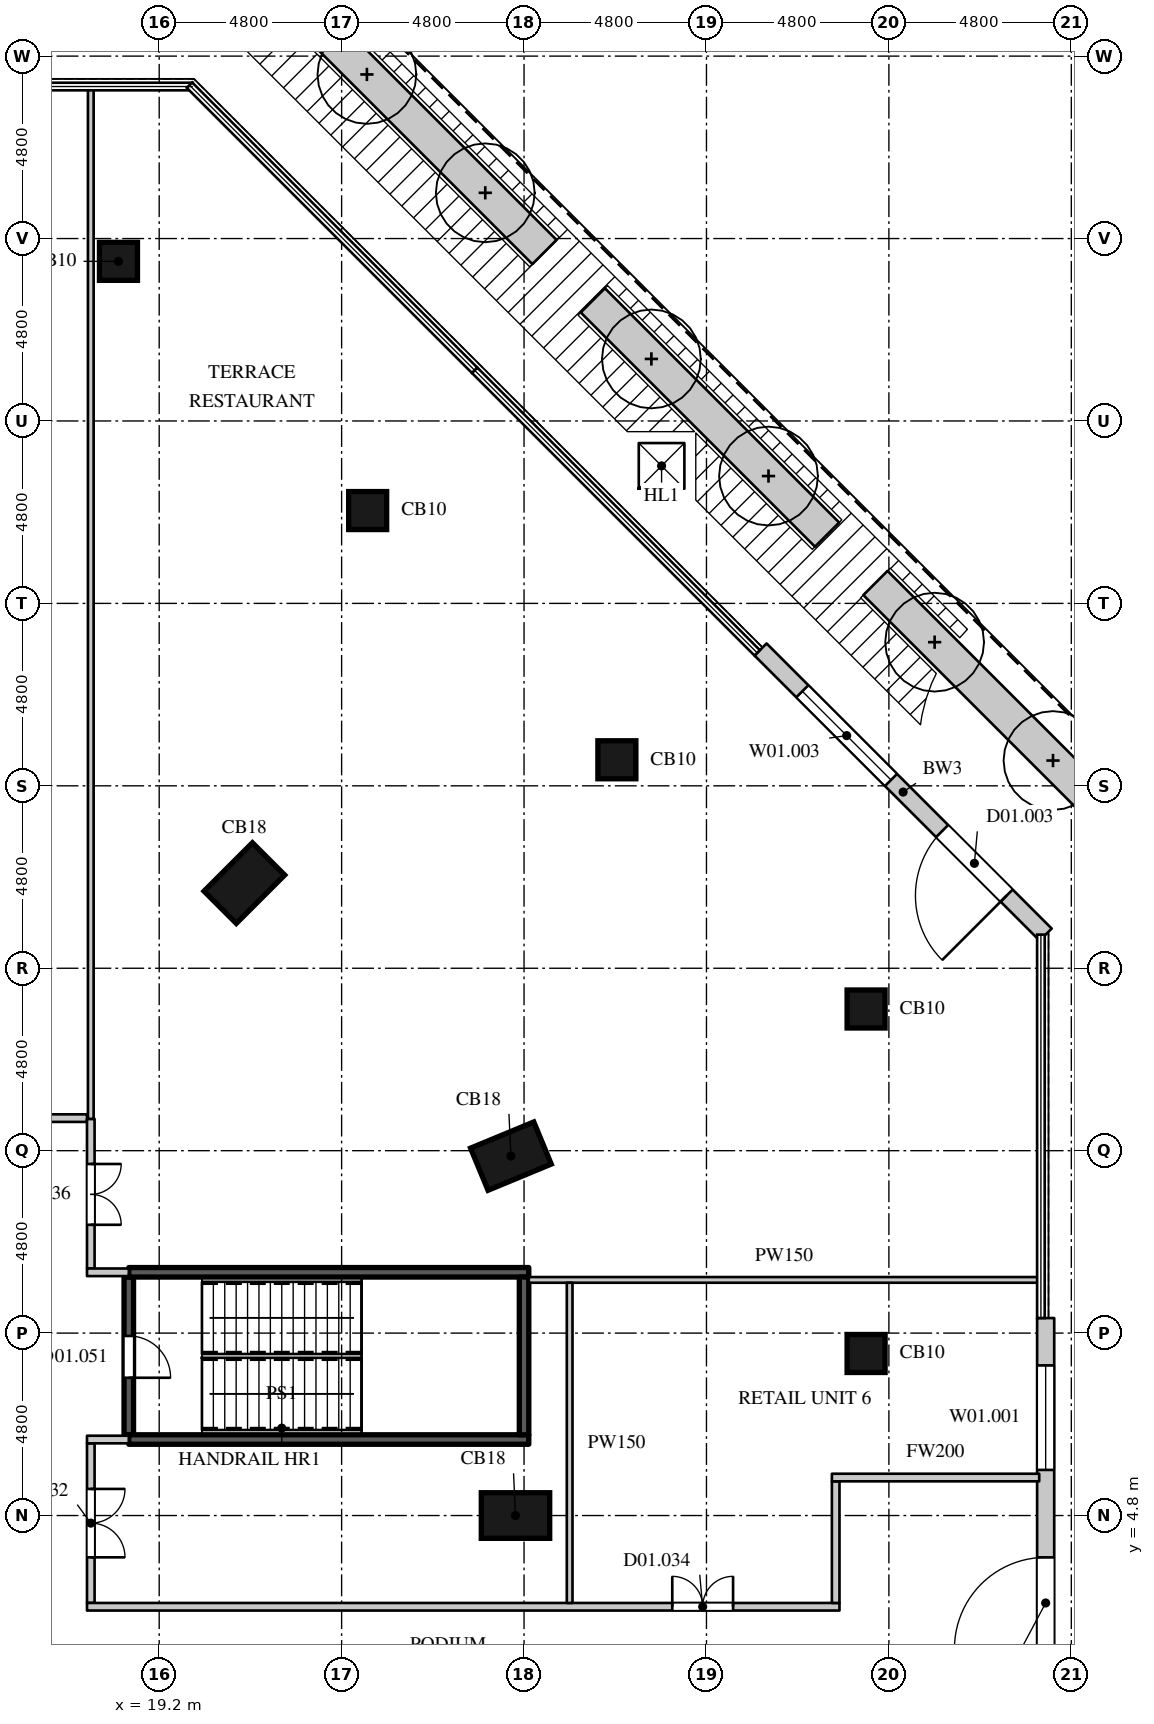
"""IFC4 building model, lengths in metres.
Left out: names, types, materials, properties, quantities, classifications, styles, units other than length and angle.
Written with IfcOpenShell. Run it as: python <this file> out.ifc"""

import sys

from ifc_helpers import new_model, si_unit, direction, frame, frame_2d, origin, origin_2d, place, context, subcontext, project, spatial, rectangle, extrude, element, fill, save


model = new_model("IFC4")
c1 = context("Model", 3, precision=1e-05, world=origin(), true_north=direction((0.0, 1.0)))
c2 = subcontext(c1, "Body", "Model", "MODEL_VIEW")
j1 = project(units=[si_unit("LENGTHUNIT", "METRE"), si_unit("PLANEANGLEUNIT", "RADIAN")], contexts=[c1])
p1 = place(None, origin())
s1 = spatial("IfcSite", under=j1, at=p1, CompositionType="ELEMENT")
p2 = place(p1, origin())
s2 = spatial("IfcBuilding", under=s1, at=p2, CompositionType="ELEMENT")
p3 = place(p2, frame((0.0, 0.0, 6.0)))
s3 = spatial("IfcBuildingStorey", under=s2, at=p3, CompositionType="ELEMENT", Elevation=6.0)
p4 = place(p3, frame((28.575, 4.8, 0.0), z_axis=(0.0, 0.0, 1.0), x_axis=(0.0, 1.0, 0.0)))
e1 = element("IfcColumn", 1, at=p4, inside=s3, PredefinedType="COLUMN", context=c2, shape_type="SweptSolid", body=[
    extrude(rectangle(XDim=1.2, YDim=1.8, at=origin_2d()), origin(), (0.0, 0.0, 1.0), 5.0),
])
p5 = place(p3, frame((37.8, 9.064, 0.0), z_axis=(0.0, 0.0, 1.0), x_axis=(1.0, 0.0, 0.0)))
e2 = element("IfcColumn", 2, at=p5, inside=s3, PredefinedType="COLUMN", context=c2, shape_type="SweptSolid", body=[
    extrude(rectangle(XDim=1.0, YDim=1.0, at=origin_2d()), origin(), (0.0, 0.0, 1.0), 5.0),
])
p6 = place(p3, frame((28.454, 14.257, 0.0), z_axis=(0.0, 0.0, 1.0), x_axis=(-0.382683496864, 0.923879505795, 0.0)))
e3 = element("IfcColumn", 3, at=p6, inside=s3, PredefinedType="COLUMN", context=c2, shape_type="SweptSolid", body=[
    extrude(rectangle(XDim=1.2, YDim=1.8, at=origin_2d()), origin(), (0.0, 0.0, 1.0), 5.0),
])
p7 = place(p3, frame((37.8, 18.128, 0.0), z_axis=(0.0, 0.0, 1.0), x_axis=(1.0, 0.0, 0.0)))
e4 = element("IfcColumn", 4, at=p7, inside=s3, PredefinedType="COLUMN", context=c2, shape_type="SweptSolid", body=[
    extrude(rectangle(XDim=1.0, YDim=1.0, at=origin_2d()), origin(), (0.0, 0.0, 1.0), 5.0),
])
p8 = place(p3, frame((21.441, 21.441, 0.0), z_axis=(0.0, 0.0, 1.0), x_axis=(-0.707106781187, 0.707106781187, 0.0)))
e5 = element("IfcColumn", 5, at=p8, inside=s3, PredefinedType="COLUMN", context=c2, shape_type="SweptSolid", body=[
    extrude(rectangle(XDim=1.2, YDim=1.8, at=origin_2d()), origin(), (0.0, 0.0, 1.0), 5.0),
])
for number, where, z_axis, x_axis in (
    (6, (31.243, 24.685, 0.0), (0.0, 0.0, 1.0), (1.0, 0.0, 0.0)),
    (7, (24.685, 31.243, 0.0), (0.0, 0.0, 1.0), (1.0, 0.0, 0.0)),
    (8, (18.128, 37.8, 0.0), (0.0, 0.0, 1.0), (1.0, 0.0, 0.0)),
):
    element("IfcColumn", number, at=place(p3, frame(where, z_axis=z_axis, x_axis=x_axis)), inside=s3, PredefinedType="COLUMN", context=c2, shape_type="SweptSolid", body=[
        extrude(rectangle(XDim=1.0, YDim=1.0, at=origin_2d()), origin(), (0.0, 0.0, 1.0), 5.0),
    ])
p9 = place(p3, frame((42.525, 0.0, 0.0), z_axis=(0.0, 0.0, 1.0), x_axis=(0.0, 1.0, 0.0)))
e9 = element("IfcWall", 9, at=p9, inside=s3, PredefinedType="ELEMENTEDWALL", context=c2, shape_type="SweptSolid", body=[
    extrude(rectangle(XDim=9.996, YDim=0.45, at=frame_2d((4.998, 0.0))), origin(), (0.0, 0.0, 1.0), 4.7),
])
p10 = place(p9, frame((1.299, 0.0, 0.0)))
e10 = element("IfcOpeningElement", 10, at=p10, cuts=e9, PredefinedType="OPENING", context=c2, shape_type="SweptSolid", body=[
    extrude(rectangle(XDim=2.4, YDim=2.7, at=frame_2d((1.2, 1.35))), frame((0.0, 0.235, 0.0), z_axis=(0.0, -1.0, 0.0), x_axis=(1.0, 0.0, 0.0)), (0.0, 0.0, 1.0), 0.47),
])
p11 = place(p9, frame((6.0, 0.0, 1.05)))
e11 = element("IfcOpeningElement", 11, at=p11, cuts=e9, PredefinedType="OPENING", context=c2, shape_type="SweptSolid", body=[
    extrude(rectangle(XDim=2.75, YDim=2.7, at=frame_2d((1.375, 1.35))), frame((0.0, 0.235, 0.0), z_axis=(0.0, -1.0, 0.0), x_axis=(1.0, 0.0, 0.0)), (0.0, 0.0, 1.0), 0.47),
])
p12 = place(p3, frame((42.525, 20.085, 0.0), z_axis=(0.0, 0.0, 1.0), x_axis=(-0.707106781187, 0.707106781187, 0.0)))
e12 = element("IfcWall", 12, at=p12, inside=s3, PredefinedType="ELEMENTEDWALL", context=c2, shape_type="SweptSolid", body=[
    extrude(rectangle(XDim=10.609, YDim=0.45, at=frame_2d((5.305, 0.0))), origin(), (0.0, 0.0, 1.0), 4.7),
])
p13 = place(p12, frame((1.452, 0.0, 0.0)))
e13 = element("IfcOpeningElement", 13, at=p13, cuts=e12, PredefinedType="OPENING", context=c2, shape_type="SweptSolid", body=[
    extrude(rectangle(XDim=2.4, YDim=2.7, at=frame_2d((1.2, 1.35))), frame((0.0, 0.235, 0.0), z_axis=(0.0, -1.0, 0.0), x_axis=(1.0, 0.0, 0.0)), (0.0, 0.0, 1.0), 0.47),
])
p14 = place(p12, frame((5.755, 0.0, 1.05)))
e14 = element("IfcOpeningElement", 14, at=p14, cuts=e12, PredefinedType="OPENING", context=c2, shape_type="SweptSolid", body=[
    extrude(rectangle(XDim=3.3, YDim=2.7, at=frame_2d((1.65, 1.35))), frame((0.0, 0.235, 0.0), z_axis=(0.0, -1.0, 0.0), x_axis=(1.0, 0.0, 0.0)), (0.0, 0.0, 1.0), 0.47),
])
p15 = place(p3, frame((44.275, 23.108, 0.0), z_axis=(0.0, 0.0, 1.0), x_axis=(-0.707106781187, 0.707106781187, 0.0)))
e15 = element("IfcWall", 15, at=p15, inside=s3, PredefinedType="USERDEFINED", context=c2, shape_type="SweptSolid", body=[
    extrude(rectangle(XDim=8.81, YDim=0.9, at=frame_2d((4.405, 0.0))), origin(), (0.0, 0.0, 1.0), 0.9),
])
p16 = place(p3, frame((36.773, 30.61, 0.0), z_axis=(0.0, 0.0, 1.0), x_axis=(-0.707106781187, 0.707106781187, 0.0)))
e16 = element("IfcWall", 16, at=p16, inside=s3, PredefinedType="USERDEFINED", context=c2, shape_type="SweptSolid", body=[
    extrude(rectangle(XDim=8.716, YDim=0.9, at=frame_2d((4.358, 0.0))), origin(), (0.0, 0.0, 1.0), 0.9),
])
p17 = place(p3, frame((29.337, 38.046, 0.0), z_axis=(0.0, 0.0, 1.0), x_axis=(-0.707106781187, 0.707106781187, 0.0)))
e17 = element("IfcWall", 17, at=p17, inside=s3, PredefinedType="USERDEFINED", context=c2, shape_type="SweptSolid", body=[
    extrude(rectangle(XDim=8.81, YDim=0.9, at=frame_2d((4.405, 0.0))), origin(), (0.0, 0.0, 1.0), 0.9),
])
p18 = place(p3, frame((11.1, 15.257, 0.0), z_axis=(0.0, 0.0, 1.0), x_axis=(1.0, 0.0, 0.0)))
e18 = element("IfcWall", 18, at=p18, inside=s3, PredefinedType="PARTITIONING", context=c2, shape_type="SweptSolid", body=[
    extrude(rectangle(XDim=6.2, YDim=0.2, at=frame_2d((3.1, 0.0))), origin(), (0.0, 0.0, 1.0), 4.4),
])
p19 = place(p3, frame((17.4, 2.5, 0.0), z_axis=(0.0, 0.0, 1.0), x_axis=(0.0, 1.0, 0.0)))
e19 = element("IfcWall", 19, at=p19, inside=s3, PredefinedType="PARTITIONING", context=c2, shape_type="SweptSolid", body=[
    extrude(rectangle(XDim=4.2, YDim=0.2, at=frame_2d((2.1, 0.0))), origin(), (0.0, 0.0, 1.0), 4.4),
])
p20 = place(p19, frame((1.2, 0.0, 0.0)))
e20 = element("IfcOpeningElement", 20, at=p20, cuts=e19, PredefinedType="OPENING", context=c2, shape_type="SweptSolid", body=[
    extrude(rectangle(XDim=1.8, YDim=2.4, at=frame_2d((0.9, 1.2))), frame((0.0, 0.11, 0.0), z_axis=(0.0, -1.0, 0.0), x_axis=(1.0, 0.0, 0.0)), (0.0, 0.0, 1.0), 0.22),
])
p21 = place(p3, frame((17.3, 2.4, 0.0), z_axis=(0.0, 0.0, 1.0), x_axis=(1.0, 0.0, 0.0)))
e21 = element("IfcWall", 21, at=p21, inside=s3, PredefinedType="PARTITIONING", context=c2, shape_type="SweptSolid", body=[
    extrude(rectangle(XDim=19.8, YDim=0.2, at=frame_2d((9.9, 0.0))), origin(), (0.0, 0.0, 1.0), 4.4),
])
p22 = place(p21, frame((15.4, 0.0, 0.0)))
e22 = element("IfcOpeningElement", 22, at=p22, cuts=e21, PredefinedType="OPENING", context=c2, shape_type="SweptSolid", body=[
    extrude(rectangle(XDim=1.6, YDim=2.4, at=frame_2d((0.8, 1.2))), frame((0.0, 0.11, 0.0), z_axis=(0.0, -1.0, 0.0), x_axis=(1.0, 0.0, 0.0)), (0.0, 0.0, 1.0), 0.22),
])
p23 = place(p3, frame((17.3, 6.8, 0.0), z_axis=(0.0, 0.0, 1.0), x_axis=(1.0, 0.0, 0.0)))
e23 = element("IfcWall", 23, at=p23, inside=s3, PredefinedType="PARTITIONING", context=c2, shape_type="SweptSolid", body=[
    extrude(rectangle(XDim=1.1, YDim=0.2, at=frame_2d((0.55, 0.0))), origin(), (0.0, 0.0, 1.0), 4.4),
])
p24 = place(p3, frame((17.4, 11.3, 0.0), z_axis=(0.0, 0.0, 1.0), x_axis=(0.0, 1.0, 0.0)))
e24 = element("IfcWall", 24, at=p24, inside=s3, PredefinedType="PARTITIONING", context=c2, shape_type="SweptSolid", body=[
    extrude(rectangle(XDim=3.937, YDim=0.2, at=frame_2d((1.968, 0.0))), origin(), (0.0, 0.0, 1.0), 4.4),
])
p25 = place(p24, frame((1.15, 0.0, 0.0)))
e25 = element("IfcOpeningElement", 25, at=p25, cuts=e24, PredefinedType="OPENING", context=c2, shape_type="SweptSolid", body=[
    extrude(rectangle(XDim=1.6, YDim=2.4, at=frame_2d((0.8, 1.2))), frame((0.0, 0.11, 0.0), z_axis=(0.0, -1.0, 0.0), x_axis=(1.0, 0.0, 0.0)), (0.0, 0.0, 1.0), 0.22),
])
p26 = place(p3, frame((17.3, 11.2, 0.0), z_axis=(0.0, 0.0, 1.0), x_axis=(1.0, 0.0, 0.0)))
e26 = element("IfcWall", 26, at=p26, inside=s3, PredefinedType="PARTITIONING", context=c2, shape_type="SweptSolid", body=[
    extrude(rectangle(XDim=1.1, YDim=0.2, at=frame_2d((0.55, 0.0))), origin(), (0.0, 0.0, 1.0), 4.4),
])
p27 = place(p3, frame((37.0, 2.5, 0.0), z_axis=(0.0, 0.0, 1.0), x_axis=(0.0, 1.0, 0.0)))
e27 = element("IfcWall", 27, at=p27, inside=s3, PredefinedType="PARTITIONING", context=c2, shape_type="SweptSolid", body=[
    extrude(rectangle(XDim=3.2, YDim=0.2, at=frame_2d((1.6, 0.0))), origin(), (0.0, 0.0, 1.0), 4.4),
])
p28 = place(p3, frame((36.9, 5.8, 0.0), z_axis=(0.0, 0.0, 1.0), x_axis=(1.0, 0.0, 0.0)))
e28 = element("IfcWall", 28, at=p28, inside=s3, PredefinedType="PARTITIONING", context=c2, shape_type="SweptSolid", body=[
    extrude(rectangle(XDim=5.455, YDim=0.2, at=frame_2d((2.728, 0.0))), origin(), (0.0, 0.0, 1.0), 4.4),
])
p29 = place(p3, frame((17.4, 15.237, 0.0), z_axis=(0.0, 0.0, 1.0), x_axis=(0.0, 1.0, 0.0)))
e29 = element("IfcWall", 29, at=p29, inside=s3, PredefinedType="PARTITIONING", context=c2, shape_type="SweptSolid", body=[
    extrude(rectangle(XDim=27.118, YDim=0.15, at=frame_2d((13.559, 0.0))), origin(), (0.0, 0.0, 1.0), 4.4),
])
p30 = place(p3, frame((28.925, 11.0, 0.0), z_axis=(0.0, 0.0, 1.0), x_axis=(1.0, 0.0, 0.0)))
e30 = element("IfcWall", 30, at=p30, inside=s3, PredefinedType="PARTITIONING", context=c2, shape_type="SweptSolid", body=[
    extrude(rectangle(XDim=13.43, YDim=0.15, at=frame_2d((6.715, 0.0))), origin(), (0.0, 0.0, 1.0), 4.4),
])
p31 = place(p3, frame((30.0, 2.5, 0.0), z_axis=(0.0, 0.0, 1.0), x_axis=(0.0, 1.0, 0.0)))
e31 = element("IfcWall", 31, at=p31, inside=s3, PredefinedType="PARTITIONING", context=c2, shape_type="SweptSolid", body=[
    extrude(rectangle(XDim=8.425, YDim=0.15, at=frame_2d((4.212, 0.0))), origin(), (0.0, 0.0, 1.0), 4.4),
])
p32 = place(p3, frame((18.4, 6.925, 0.0), z_axis=(0.0, 0.0, 1.0), x_axis=(0.0, 1.0, 0.0)))
e32 = element("IfcWall", 32, at=p32, inside=s3, PredefinedType="SHEAR", context=c2, shape_type="SweptSolid", body=[
    extrude(rectangle(XDim=4.15, YDim=0.25, at=frame_2d((2.075, 0.0))), origin(), (0.0, 0.0, 1.0), 4.65),
])
p33 = place(p32, frame((1.5, 0.0, 0.0)))
e33 = element("IfcOpeningElement", 33, at=p33, cuts=e32, PredefinedType="OPENING", context=c2, shape_type="SweptSolid", body=[
    extrude(rectangle(XDim=1.1, YDim=2.2, at=frame_2d((0.55, 1.1))), frame((0.0, 0.135, 0.0), z_axis=(0.0, -1.0, 0.0), x_axis=(1.0, 0.0, 0.0)), (0.0, 0.0, 1.0), 0.27),
])
for number, where, z_axis, x_axis in (
    (34, (18.4, 6.8, 0.0), (0.0, 0.0, 1.0), (1.0, 0.0, 0.0)),
    (35, (18.4, 11.2, 0.0), (0.0, 0.0, 1.0), (1.0, 0.0, 0.0)),
):
    element("IfcWall", number, at=place(p3, frame(where, z_axis=z_axis, x_axis=x_axis)), inside=s3, PredefinedType="SHEAR", context=c2, shape_type="SweptSolid", body=[
        extrude(rectangle(XDim=10.525, YDim=0.25, at=frame_2d((5.263, 0.0))), origin(), (0.0, 0.0, 1.0), 4.65),
    ])
p34 = place(p3, frame((28.8, 6.925, 0.0), z_axis=(0.0, 0.0, 1.0), x_axis=(0.0, 1.0, 0.0)))
e36 = element("IfcWall", 36, at=p34, inside=s3, PredefinedType="SHEAR", context=c2, shape_type="SweptSolid", body=[
    extrude(rectangle(XDim=4.15, YDim=0.25, at=frame_2d((2.075, 0.0))), origin(), (0.0, 0.0, 1.0), 4.65),
])
p35 = place(p10, origin())
e37 = element("IfcDoor", 37, at=p35, inside=s3, OperationType="SINGLE_SWING_LEFT", PredefinedType="DOOR", context=c2, shape_type="SweptSolid", body=[
    extrude(rectangle(XDim=2.4, YDim=2.7, at=frame_2d((1.2, 1.35))), frame((0.0, 0.13, 0.0), z_axis=(0.0, -1.0, 0.0), x_axis=(1.0, 0.0, 0.0)), (0.0, 0.0, 1.0), 0.05),
])
fill(e10, e37)
p36 = place(p11, origin())
e38 = element("IfcWindow", 38, at=p36, inside=s3, PartitioningType="SINGLE_PANEL", PredefinedType="WINDOW", context=c2, shape_type="SweptSolid", body=[
    extrude(rectangle(XDim=2.75, YDim=2.7, at=frame_2d((1.375, 1.35))), frame((0.0, 0.135, 0.0), z_axis=(0.0, -1.0, 0.0), x_axis=(1.0, 0.0, 0.0)), (0.0, 0.0, 1.0), 0.06),
])
fill(e11, e38)
p37 = place(p13, origin())
e39 = element("IfcDoor", 39, at=p37, inside=s3, OperationType="SINGLE_SWING_LEFT", PredefinedType="DOOR", context=c2, shape_type="SweptSolid", body=[
    extrude(rectangle(XDim=2.4, YDim=2.7, at=frame_2d((1.2, 1.35))), frame((0.0, 0.13, 0.0), z_axis=(0.0, -1.0, 0.0), x_axis=(1.0, 0.0, 0.0)), (0.0, 0.0, 1.0), 0.05),
])
fill(e13, e39)
p38 = place(p14, origin())
e40 = element("IfcWindow", 40, at=p38, inside=s3, PartitioningType="SINGLE_PANEL", PredefinedType="WINDOW", context=c2, shape_type="SweptSolid", body=[
    extrude(rectangle(XDim=3.3, YDim=2.7, at=frame_2d((1.65, 1.35))), frame((0.0, 0.135, 0.0), z_axis=(0.0, -1.0, 0.0), x_axis=(1.0, 0.0, 0.0)), (0.0, 0.0, 1.0), 0.06),
])
fill(e14, e40)
p39 = place(p3, frame((0.0, 0.0, -0.35)))
p40 = place(p39, frame((32.419, 32.419, 0.0)))
p41 = place(p40, frame((0.0, 0.0, 0.3)))
e41 = element("IfcWindow", 41, at=p41, inside=s3, PartitioningType="SINGLE_PANEL", PredefinedType="SKYLIGHT", context=c2, shape_type="SweptSolid", body=[
    extrude(rectangle(XDim=1.2, YDim=1.2, at=origin_2d()), origin(), (0.0, 0.0, 1.0), 0.05),
])
p42 = place(p20, origin())
e42 = element("IfcDoor", 42, at=p42, inside=s3, OperationType="DOUBLE_DOOR_SINGLE_SWING", PredefinedType="DOOR", context=c2, shape_type="SweptSolid", body=[
    extrude(rectangle(XDim=1.8, YDim=2.4, at=frame_2d((0.9, 1.2))), frame((0.0, 0.025, 0.0), z_axis=(0.0, -1.0, 0.0), x_axis=(1.0, 0.0, 0.0)), (0.0, 0.0, 1.0), 0.05),
])
fill(e20, e42)
p43 = place(p22, origin())
e43 = element("IfcDoor", 43, at=p43, inside=s3, OperationType="DOUBLE_DOOR_SINGLE_SWING", PredefinedType="DOOR", context=c2, shape_type="SweptSolid", body=[
    extrude(rectangle(XDim=1.6, YDim=2.4, at=frame_2d((0.8, 1.2))), frame((0.0, 0.025, 0.0), z_axis=(0.0, -1.0, 0.0), x_axis=(1.0, 0.0, 0.0)), (0.0, 0.0, 1.0), 0.05),
])
fill(e22, e43)
p44 = place(p25, origin())
e44 = element("IfcDoor", 44, at=p44, inside=s3, OperationType="DOUBLE_DOOR_SINGLE_SWING", PredefinedType="DOOR", context=c2, shape_type="SweptSolid", body=[
    extrude(rectangle(XDim=1.6, YDim=2.4, at=frame_2d((0.8, 1.2))), frame((0.0, 0.025, 0.0), z_axis=(0.0, -1.0, 0.0), x_axis=(1.0, 0.0, 0.0)), (0.0, 0.0, 1.0), 0.05),
])
fill(e25, e44)
p45 = place(p33, origin())
e45 = element("IfcDoor", 45, at=p45, inside=s3, OperationType="SINGLE_SWING_RIGHT", PredefinedType="DOOR", context=c2, shape_type="SweptSolid", body=[
    extrude(rectangle(XDim=1.1, YDim=2.2, at=frame_2d((0.55, 1.1))), frame((0.0, 0.025, 0.0), z_axis=(0.0, -1.0, 0.0), x_axis=(1.0, 0.0, 0.0)), (0.0, 0.0, 1.0), 0.05),
])
fill(e33, e45)
save(model, sys.argv[1])
